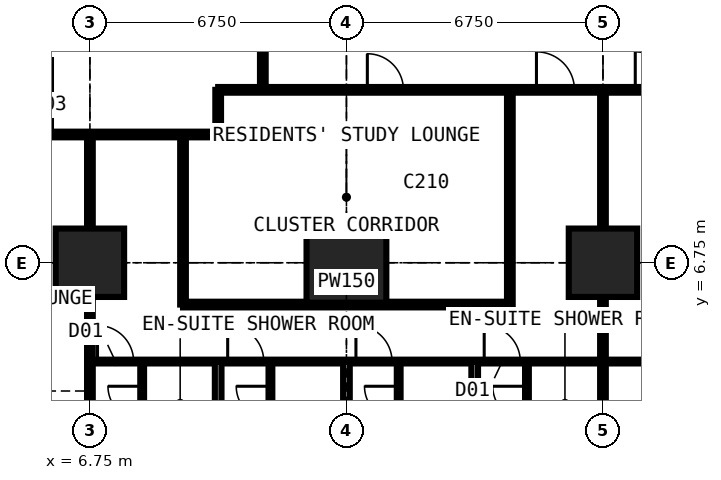
"""IFC4 building model, lengths in metres.
Left out: names, types, materials, properties, quantities, classifications, styles, units other than length and angle.
Written with IfcOpenShell. Run it as: python <this file> out.ifc"""

import sys

from ifc_helpers import new_model, si_unit, direction, frame, frame_2d, origin, origin_2d, place, context, subcontext, project, spatial, rectangle, extrude, element, fill, save


model = new_model("IFC4")
c1 = context("Model", 3, precision=1e-05, world=origin(), true_north=direction((0.0, 1.0)))
c2 = subcontext(c1, "Body", "Model", "MODEL_VIEW")
j1 = project(units=[si_unit("LENGTHUNIT", "METRE"), si_unit("PLANEANGLEUNIT", "RADIAN")], contexts=[c1])
p1 = place(None, origin())
s1 = spatial("IfcSite", under=j1, at=p1, CompositionType="ELEMENT")
p2 = place(p1, origin())
s2 = spatial("IfcBuilding", under=s1, at=p2, CompositionType="ELEMENT")
p3 = place(p2, frame((0.0, 0.0, 83.7)))
s3 = spatial("IfcBuildingStorey", under=s2, at=p3, CompositionType="ELEMENT", Elevation=83.7)
p4 = place(p3, frame((6.75, 6.75, 0.0), z_axis=(0.0, 0.0, 1.0), x_axis=(1.0, 0.0, 0.0)))
e1 = element("IfcColumn", 1, at=p4, inside=s3, PredefinedType="COLUMN", context=c2, shape_type="SweptSolid", body=[
    extrude(rectangle(XDim=1.8, YDim=1.8, at=origin_2d()), origin(), (0.0, 0.0, 1.0), 3.6),
])
p5 = place(p3, frame((13.5, 6.75, 0.0), z_axis=(0.0, 0.0, 1.0), x_axis=(1.0, 0.0, 0.0)))
e2 = element("IfcColumn", 2, at=p5, inside=s3, PredefinedType="COLUMN", context=c2, shape_type="SweptSolid", body=[
    extrude(rectangle(XDim=2.1, YDim=2.1, at=origin_2d()), origin(), (0.0, 0.0, 1.0), 3.6),
])
p6 = place(p3, frame((20.25, 6.75, 0.0), z_axis=(0.0, 0.0, 1.0), x_axis=(1.0, 0.0, 0.0)))
e3 = element("IfcColumn", 3, at=p6, inside=s3, PredefinedType="COLUMN", context=c2, shape_type="SweptSolid", body=[
    extrude(rectangle(XDim=1.8, YDim=1.8, at=origin_2d()), origin(), (0.0, 0.0, 1.0), 3.6),
])
p7 = place(p3, frame((-0.734, 10.125, 0.0), z_axis=(0.0, 0.0, 1.0), x_axis=(1.0, 0.0, 0.0)))
e4 = element("IfcWall", 4, at=p7, inside=s3, PredefinedType="PARTITIONING", context=c2, shape_type="SweptSolid", body=[
    extrude(rectangle(XDim=10.859, YDim=0.15, at=frame_2d((5.429, 0.0))), origin(), (0.0, 0.0, 1.0), 3.375),
])
p8 = place(p7, frame((5.134, 0.0, 0.0)))
e5 = element("IfcOpeningElement", 5, at=p8, cuts=e4, PredefinedType="OPENING", context=c2, shape_type="SweptSolid", body=[
    extrude(rectangle(XDim=1.0, YDim=2.2, at=frame_2d((0.5, 1.1))), frame((0.0, 0.085, 0.0), z_axis=(0.0, -1.0, 0.0), x_axis=(1.0, 0.0, 0.0)), (0.0, 0.0, 1.0), 0.17),
])
p9 = place(p3, frame((6.75, -0.734, 0.0), z_axis=(0.0, 0.0, 1.0), x_axis=(0.0, 1.0, 0.0)))
e6 = element("IfcWall", 6, at=p9, inside=s3, PredefinedType="PARTITIONING", context=c2, shape_type="SweptSolid", body=[
    extrude(rectangle(XDim=10.859, YDim=0.15, at=frame_2d((5.429, 0.0))), origin(), (0.0, 0.0, 1.0), 2.877),
])
p10 = place(p3, frame((6.75, 4.15, 0.0), z_axis=(0.0, 0.0, 1.0), x_axis=(1.0, 0.0, 0.0)))
e7 = element("IfcWall", 7, at=p10, inside=s3, PredefinedType="PARTITIONING", context=c2, shape_type="SweptSolid", body=[
    extrude(rectangle(XDim=23.625, YDim=0.1, at=frame_2d((11.812, 0.0))), origin(), (0.0, 0.0, 1.0), 3.375),
])
p11 = place(p10, frame((0.2, 0.0, 0.0)))
e8 = element("IfcOpeningElement", 8, at=p11, cuts=e7, PredefinedType="OPENING", context=c2, shape_type="SweptSolid", body=[
    extrude(rectangle(XDim=0.95, YDim=2.2, at=frame_2d((0.475, 1.1))), frame((0.0, 0.06, 0.0), z_axis=(0.0, -1.0, 0.0), x_axis=(1.0, 0.0, 0.0)), (0.0, 0.0, 1.0), 0.12),
])
p12 = place(p10, frame((3.625, 0.0, 0.0)))
e9 = element("IfcOpeningElement", 9, at=p12, cuts=e7, PredefinedType="OPENING", context=c2, shape_type="SweptSolid", body=[
    extrude(rectangle(XDim=0.95, YDim=2.2, at=frame_2d((0.475, 1.1))), frame((0.0, 0.06, 0.0), z_axis=(0.0, -1.0, 0.0), x_axis=(1.0, 0.0, 0.0)), (0.0, 0.0, 1.0), 0.12),
])
p13 = place(p10, frame((7.0, 0.0, 0.0)))
e10 = element("IfcOpeningElement", 10, at=p13, cuts=e7, PredefinedType="OPENING", context=c2, shape_type="SweptSolid", body=[
    extrude(rectangle(XDim=0.95, YDim=2.2, at=frame_2d((0.475, 1.1))), frame((0.0, 0.06, 0.0), z_axis=(0.0, -1.0, 0.0), x_axis=(1.0, 0.0, 0.0)), (0.0, 0.0, 1.0), 0.12),
])
p14 = place(p10, frame((10.375, 0.0, 0.0)))
e11 = element("IfcOpeningElement", 11, at=p14, cuts=e7, PredefinedType="OPENING", context=c2, shape_type="SweptSolid", body=[
    extrude(rectangle(XDim=0.95, YDim=2.2, at=frame_2d((0.475, 1.1))), frame((0.0, 0.06, 0.0), z_axis=(0.0, -1.0, 0.0), x_axis=(1.0, 0.0, 0.0)), (0.0, 0.0, 1.0), 0.12),
])
p15 = place(p10, frame((15.1, 0.0, 0.0)))
e12 = element("IfcOpeningElement", 12, at=p15, cuts=e7, PredefinedType="OPENING", context=c2, shape_type="SweptSolid", body=[
    extrude(rectangle(XDim=0.95, YDim=2.2, at=frame_2d((0.475, 1.1))), frame((0.0, 0.06, 0.0), z_axis=(0.0, -1.0, 0.0), x_axis=(1.0, 0.0, 0.0)), (0.0, 0.0, 1.0), 0.12),
])
p16 = place(p10, frame((20.5, 0.0, 0.0)))
e13 = element("IfcOpeningElement", 13, at=p16, cuts=e7, PredefinedType="OPENING", context=c2, shape_type="SweptSolid", body=[
    extrude(rectangle(XDim=0.95, YDim=2.2, at=frame_2d((0.475, 1.1))), frame((0.0, 0.06, 0.0), z_axis=(0.0, -1.0, 0.0), x_axis=(1.0, 0.0, 0.0)), (0.0, 0.0, 1.0), 0.12),
])
p17 = place(p3, frame((8.125, 1.95, 0.0), z_axis=(0.0, 0.0, 1.0), x_axis=(0.0, 1.0, 0.0)))
e14 = element("IfcWall", 14, at=p17, inside=s3, PredefinedType="PARTITIONING", context=c2, shape_type="SweptSolid", body=[
    extrude(rectangle(XDim=2.2, YDim=0.1, at=frame_2d((1.1, 0.0))), origin(), (0.0, 0.0, 1.0), 3.375),
])
p18 = place(p17, frame((0.65, 0.0, 0.0)))
e15 = element("IfcOpeningElement", 15, at=p18, cuts=e14, PredefinedType="OPENING", context=c2, shape_type="SweptSolid", body=[
    extrude(rectangle(XDim=0.9, YDim=2.2, at=frame_2d((0.45, 1.1))), frame((0.0, 0.06, 0.0), z_axis=(0.0, -1.0, 0.0), x_axis=(1.0, 0.0, 0.0)), (0.0, 0.0, 1.0), 0.12),
])
p19 = place(p3, frame((9.2, 5.65, 0.0), z_axis=(0.0, 0.0, 1.0), x_axis=(0.0, 1.0, 0.0)))
e16 = element("IfcWall", 16, at=p19, inside=s3, PredefinedType="PARTITIONING", context=c2, shape_type="SweptSolid", body=[
    extrude(rectangle(XDim=4.475, YDim=0.15, at=frame_2d((2.238, 0.0))), origin(), (0.0, 0.0, 1.0), 3.375),
])
p20 = place(p3, frame((9.2, 5.65, 0.0), z_axis=(0.0, 0.0, 1.0), x_axis=(1.0, 0.0, 0.0)))
e17 = element("IfcWall", 17, at=p20, inside=s3, PredefinedType="PARTITIONING", context=c2, shape_type="SweptSolid", body=[
    extrude(rectangle(XDim=8.6, YDim=0.15, at=frame_2d((4.3, 0.0))), origin(), (0.0, 0.0, 1.0), 3.375),
])
p21 = place(p3, frame((10.125, -0.734, 0.0), z_axis=(0.0, 0.0, 1.0), x_axis=(0.0, 1.0, 0.0)))
e18 = element("IfcWall", 18, at=p21, inside=s3, PredefinedType="PARTITIONING", context=c2, shape_type="SweptSolid", body=[
    extrude(rectangle(XDim=4.884, YDim=0.175, at=frame_2d((2.442, 0.0))), origin(), (0.0, 0.0, 1.0), 3.375),
])
p22 = place(p3, frame((10.125, 10.125, 0.0), z_axis=(0.0, 0.0, 1.0), x_axis=(0.0, 1.0, 0.0)))
e19 = element("IfcWall", 19, at=p22, inside=s3, PredefinedType="PARTITIONING", context=c2, shape_type="SweptSolid", body=[
    extrude(rectangle(XDim=1.175, YDim=0.15, at=frame_2d((0.587, 0.0))), origin(), (0.0, 0.0, 1.0), 3.375),
])
p23 = place(p3, frame((10.125, 11.3, 0.0), z_axis=(0.0, 0.0, 1.0), x_axis=(1.0, 0.0, 0.0)))
e20 = element("IfcWall", 20, at=p23, inside=s3, PredefinedType="PARTITIONING", context=c2, shape_type="SweptSolid", body=[
    extrude(rectangle(XDim=20.675, YDim=0.15, at=frame_2d((10.337, 0.0))), origin(), (0.0, 0.0, 1.0), 3.375),
])
p24 = place(p23, frame((8.375, 0.0, 0.0)))
e21 = element("IfcOpeningElement", 21, at=p24, cuts=e20, PredefinedType="OPENING", context=c2, shape_type="SweptSolid", body=[
    extrude(rectangle(XDim=1.0, YDim=2.2, at=frame_2d((0.5, 1.1))), frame((0.0, 0.085, 0.0), z_axis=(0.0, -1.0, 0.0), x_axis=(1.0, 0.0, 0.0)), (0.0, 0.0, 1.0), 0.17),
])
p25 = place(p23, frame((10.975, 0.0, 0.0)))
e22 = element("IfcOpeningElement", 22, at=p25, cuts=e20, PredefinedType="OPENING", context=c2, shape_type="SweptSolid", body=[
    extrude(rectangle(XDim=1.0, YDim=2.2, at=frame_2d((0.5, 1.1))), frame((0.0, 0.085, 0.0), z_axis=(0.0, -1.0, 0.0), x_axis=(1.0, 0.0, 0.0)), (0.0, 0.0, 1.0), 0.17),
])
p26 = place(p23, frame((3.925, 0.0, 0.0)))
e23 = element("IfcOpeningElement", 23, at=p26, cuts=e20, PredefinedType="OPENING", context=c2, shape_type="SweptSolid", body=[
    extrude(rectangle(XDim=0.95, YDim=2.2, at=frame_2d((0.475, 1.1))), frame((0.0, 0.085, 0.0), z_axis=(0.0, -1.0, 0.0), x_axis=(1.0, 0.0, 0.0)), (0.0, 0.0, 1.0), 0.17),
])
p27 = place(p3, frame((11.3, 11.3, 0.0), z_axis=(0.0, 0.0, 1.0), x_axis=(0.0, 1.0, 0.0)))
e24 = element("IfcWall", 24, at=p27, inside=s3, PredefinedType="PARTITIONING", context=c2, shape_type="SweptSolid", body=[
    extrude(rectangle(XDim=19.3, YDim=0.15, at=frame_2d((9.65, 0.0))), origin(), (0.0, 0.0, 1.0), 3.375),
])
p28 = place(p27, frame((13.525, 0.0, 0.0)))
e25 = element("IfcOpeningElement", 25, at=p28, cuts=e24, PredefinedType="OPENING", context=c2, shape_type="SweptSolid", body=[
    extrude(rectangle(XDim=1.0, YDim=2.2, at=frame_2d((0.5, 1.1))), frame((0.0, 0.085, 0.0), z_axis=(0.0, -1.0, 0.0), x_axis=(1.0, 0.0, 0.0)), (0.0, 0.0, 1.0), 0.17),
])
p29 = place(p27, frame((10.438, 0.0, 0.0)))
e26 = element("IfcOpeningElement", 26, at=p29, cuts=e24, PredefinedType="OPENING", context=c2, shape_type="SweptSolid", body=[
    extrude(rectangle(XDim=1.0, YDim=2.2, at=frame_2d((0.5, 1.1))), frame((0.0, 0.085, 0.0), z_axis=(0.0, -1.0, 0.0), x_axis=(1.0, 0.0, 0.0)), (0.0, 0.0, 1.0), 0.17),
])
p30 = place(p3, frame((11.5, 1.95, 0.0), z_axis=(0.0, 0.0, 1.0), x_axis=(0.0, 1.0, 0.0)))
e27 = element("IfcWall", 27, at=p30, inside=s3, PredefinedType="PARTITIONING", context=c2, shape_type="SweptSolid", body=[
    extrude(rectangle(XDim=2.2, YDim=0.1, at=frame_2d((1.1, 0.0))), origin(), (0.0, 0.0, 1.0), 3.375),
])
p31 = place(p30, frame((0.65, 0.0, 0.0)))
e28 = element("IfcOpeningElement", 28, at=p31, cuts=e27, PredefinedType="OPENING", context=c2, shape_type="SweptSolid", body=[
    extrude(rectangle(XDim=0.9, YDim=2.2, at=frame_2d((0.45, 1.1))), frame((0.0, 0.06, 0.0), z_axis=(0.0, -1.0, 0.0), x_axis=(1.0, 0.0, 0.0)), (0.0, 0.0, 1.0), 0.12),
])
p32 = place(p3, frame((13.5, -0.734, 0.0), z_axis=(0.0, 0.0, 1.0), x_axis=(0.0, 1.0, 0.0)))
e29 = element("IfcWall", 29, at=p32, inside=s3, PredefinedType="PARTITIONING", context=c2, shape_type="SweptSolid", body=[
    extrude(rectangle(XDim=4.884, YDim=0.175, at=frame_2d((2.442, 0.0))), origin(), (0.0, 0.0, 1.0), 2.61),
])
p33 = place(p3, frame((14.875, 1.95, 0.0), z_axis=(0.0, 0.0, 1.0), x_axis=(0.0, 1.0, 0.0)))
e30 = element("IfcWall", 30, at=p33, inside=s3, PredefinedType="PARTITIONING", context=c2, shape_type="SweptSolid", body=[
    extrude(rectangle(XDim=2.2, YDim=0.1, at=frame_2d((1.1, 0.0))), origin(), (0.0, 0.0, 1.0), 3.375),
])
p34 = place(p33, frame((0.65, 0.0, 0.0)))
e31 = element("IfcOpeningElement", 31, at=p34, cuts=e30, PredefinedType="OPENING", context=c2, shape_type="SweptSolid", body=[
    extrude(rectangle(XDim=0.9, YDim=2.2, at=frame_2d((0.45, 1.1))), frame((0.0, 0.06, 0.0), z_axis=(0.0, -1.0, 0.0), x_axis=(1.0, 0.0, 0.0)), (0.0, 0.0, 1.0), 0.12),
])
p35 = place(p3, frame((16.875, -0.734, 0.0), z_axis=(0.0, 0.0, 1.0), x_axis=(0.0, 1.0, 0.0)))
e32 = element("IfcWall", 32, at=p35, inside=s3, PredefinedType="PARTITIONING", context=c2, shape_type="SweptSolid", body=[
    extrude(rectangle(XDim=4.884, YDim=0.175, at=frame_2d((2.442, 0.0))), origin(), (0.0, 0.0, 1.0), 3.375),
])
p36 = place(p3, frame((17.8, 5.65, 0.0), z_axis=(0.0, 0.0, 1.0), x_axis=(0.0, 1.0, 0.0)))
e33 = element("IfcWall", 33, at=p36, inside=s3, PredefinedType="PARTITIONING", context=c2, shape_type="SweptSolid", body=[
    extrude(rectangle(XDim=5.65, YDim=0.15, at=frame_2d((2.825, 0.0))), origin(), (0.0, 0.0, 1.0), 3.375),
])
p37 = place(p3, frame((18.25, 1.95, 0.0), z_axis=(0.0, 0.0, 1.0), x_axis=(0.0, 1.0, 0.0)))
e34 = element("IfcWall", 34, at=p37, inside=s3, PredefinedType="PARTITIONING", context=c2, shape_type="SweptSolid", body=[
    extrude(rectangle(XDim=2.2, YDim=0.1, at=frame_2d((1.1, 0.0))), origin(), (0.0, 0.0, 1.0), 3.375),
])
p38 = place(p37, frame((0.65, 0.0, 0.0)))
e35 = element("IfcOpeningElement", 35, at=p38, cuts=e34, PredefinedType="OPENING", context=c2, shape_type="SweptSolid", body=[
    extrude(rectangle(XDim=0.9, YDim=2.2, at=frame_2d((0.45, 1.1))), frame((0.0, 0.06, 0.0), z_axis=(0.0, -1.0, 0.0), x_axis=(1.0, 0.0, 0.0)), (0.0, 0.0, 1.0), 0.12),
])
p39 = place(p3, frame((20.25, -0.734, 0.0), z_axis=(0.0, 0.0, 1.0), x_axis=(0.0, 1.0, 0.0)))
e36 = element("IfcWall", 36, at=p39, inside=s3, PredefinedType="PARTITIONING", context=c2, shape_type="SweptSolid", body=[
    extrude(rectangle(XDim=12.034, YDim=0.15, at=frame_2d((6.017, 0.0))), origin(), (0.0, 0.0, 1.0), 2.61),
])
p40 = place(p11, origin())
e37 = element("IfcDoor", 37, at=p40, inside=s3, OperationType="SINGLE_SWING_LEFT", PredefinedType="DOOR", context=c2, shape_type="SweptSolid", body=[
    extrude(rectangle(XDim=0.95, YDim=2.2, at=frame_2d((0.475, 1.1))), frame((0.0, 0.025, 0.0), z_axis=(0.0, -1.0, 0.0), x_axis=(1.0, 0.0, 0.0)), (0.0, 0.0, 1.0), 0.05),
])
fill(e8, e37)
p41 = place(p18, origin())
e38 = element("IfcDoor", 38, at=p41, inside=s3, OperationType="SINGLE_SWING_RIGHT", PredefinedType="DOOR", context=c2, shape_type="SweptSolid", body=[
    extrude(rectangle(XDim=0.9, YDim=2.2, at=frame_2d((0.45, 1.1))), frame((0.0, 0.025, 0.0), z_axis=(0.0, -1.0, 0.0), x_axis=(1.0, 0.0, 0.0)), (0.0, 0.0, 1.0), 0.05),
])
fill(e15, e38)
p42 = place(p12, origin())
e39 = element("IfcDoor", 39, at=p42, inside=s3, OperationType="SINGLE_SWING_LEFT", PredefinedType="DOOR", context=c2, shape_type="SweptSolid", body=[
    extrude(rectangle(XDim=0.95, YDim=2.2, at=frame_2d((0.475, 1.1))), frame((0.0, 0.025, 0.0), z_axis=(0.0, -1.0, 0.0), x_axis=(1.0, 0.0, 0.0)), (0.0, 0.0, 1.0), 0.05),
])
fill(e9, e39)
p43 = place(p31, origin())
e40 = element("IfcDoor", 40, at=p43, inside=s3, OperationType="SINGLE_SWING_RIGHT", PredefinedType="DOOR", context=c2, shape_type="SweptSolid", body=[
    extrude(rectangle(XDim=0.9, YDim=2.2, at=frame_2d((0.45, 1.1))), frame((0.0, 0.025, 0.0), z_axis=(0.0, -1.0, 0.0), x_axis=(1.0, 0.0, 0.0)), (0.0, 0.0, 1.0), 0.05),
])
fill(e28, e40)
p44 = place(p13, origin())
e41 = element("IfcDoor", 41, at=p44, inside=s3, OperationType="SINGLE_SWING_LEFT", PredefinedType="DOOR", context=c2, shape_type="SweptSolid", body=[
    extrude(rectangle(XDim=0.95, YDim=2.2, at=frame_2d((0.475, 1.1))), frame((0.0, 0.025, 0.0), z_axis=(0.0, -1.0, 0.0), x_axis=(1.0, 0.0, 0.0)), (0.0, 0.0, 1.0), 0.05),
])
fill(e10, e41)
p45 = place(p34, origin())
e42 = element("IfcDoor", 42, at=p45, inside=s3, OperationType="SINGLE_SWING_RIGHT", PredefinedType="DOOR", context=c2, shape_type="SweptSolid", body=[
    extrude(rectangle(XDim=0.9, YDim=2.2, at=frame_2d((0.45, 1.1))), frame((0.0, 0.025, 0.0), z_axis=(0.0, -1.0, 0.0), x_axis=(1.0, 0.0, 0.0)), (0.0, 0.0, 1.0), 0.05),
])
fill(e31, e42)
p46 = place(p14, origin())
e43 = element("IfcDoor", 43, at=p46, inside=s3, OperationType="SINGLE_SWING_LEFT", PredefinedType="DOOR", context=c2, shape_type="SweptSolid", body=[
    extrude(rectangle(XDim=0.95, YDim=2.2, at=frame_2d((0.475, 1.1))), frame((0.0, 0.025, 0.0), z_axis=(0.0, -1.0, 0.0), x_axis=(1.0, 0.0, 0.0)), (0.0, 0.0, 1.0), 0.05),
])
fill(e11, e43)
p47 = place(p38, origin())
e44 = element("IfcDoor", 44, at=p47, inside=s3, OperationType="SINGLE_SWING_RIGHT", PredefinedType="DOOR", context=c2, shape_type="SweptSolid", body=[
    extrude(rectangle(XDim=0.9, YDim=2.2, at=frame_2d((0.45, 1.1))), frame((0.0, 0.025, 0.0), z_axis=(0.0, -1.0, 0.0), x_axis=(1.0, 0.0, 0.0)), (0.0, 0.0, 1.0), 0.05),
])
fill(e35, e44)
p48 = place(p24, origin())
e45 = element("IfcDoor", 45, at=p48, inside=s3, OperationType="SINGLE_SWING_LEFT", PredefinedType="DOOR", context=c2, shape_type="SweptSolid", body=[
    extrude(rectangle(XDim=1.0, YDim=2.2, at=frame_2d((0.5, 1.1))), frame((0.0, 0.025, 0.0), z_axis=(0.0, -1.0, 0.0), x_axis=(1.0, 0.0, 0.0)), (0.0, 0.0, 1.0), 0.05),
])
fill(e21, e45)
p49 = place(p25, origin())
e46 = element("IfcDoor", 46, at=p49, inside=s3, OperationType="SINGLE_SWING_LEFT", PredefinedType="DOOR", context=c2, shape_type="SweptSolid", body=[
    extrude(rectangle(XDim=1.0, YDim=2.2, at=frame_2d((0.5, 1.1))), frame((0.0, 0.025, 0.0), z_axis=(0.0, -1.0, 0.0), x_axis=(1.0, 0.0, 0.0)), (0.0, 0.0, 1.0), 0.05),
])
fill(e22, e46)
p50 = place(p26, origin())
e47 = element("IfcDoor", 47, at=p50, inside=s3, OperationType="SINGLE_SWING_LEFT", PredefinedType="DOOR", context=c2, shape_type="SweptSolid", body=[
    extrude(rectangle(XDim=0.95, YDim=2.2, at=frame_2d((0.475, 1.1))), frame((0.0, 0.025, 0.0), z_axis=(0.0, -1.0, 0.0), x_axis=(1.0, 0.0, 0.0)), (0.0, 0.0, 1.0), 0.05),
])
fill(e23, e47)
save(model, sys.argv[1])
